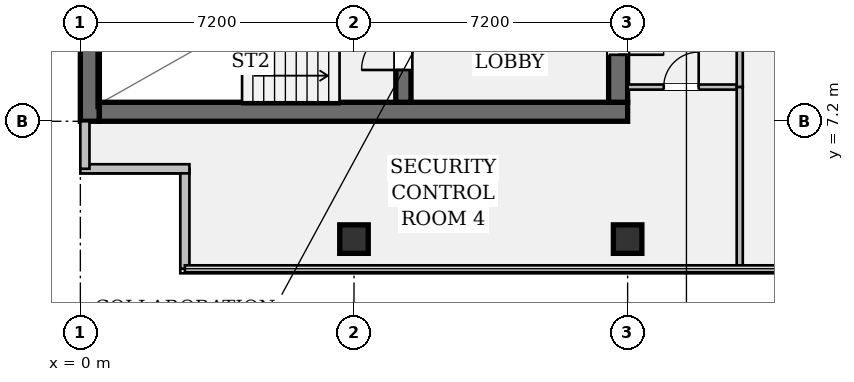
"""IFC4 building model, lengths in metres.
Left out: names, types, materials, properties, quantities, classifications, styles, units other than length and angle.
Written with IfcOpenShell. Run it as: python <this file> out.ifc"""

import sys

from ifc_helpers import new_model, si_unit, direction, frame, frame_2d, origin, origin_2d, place, context, subcontext, project, spatial, rectangle, hollow_rectangle, extrude, element, fill, save


model = new_model("IFC4")
c1 = context("Model", 3, precision=1e-05, world=origin(), true_north=direction((0.0, 1.0)))
c2 = subcontext(c1, "Body", "Model", "MODEL_VIEW")
j1 = project(units=[si_unit("LENGTHUNIT", "METRE"), si_unit("PLANEANGLEUNIT", "RADIAN")], contexts=[c1])
p1 = place(None, origin())
s1 = spatial("IfcSite", under=j1, at=p1, CompositionType="ELEMENT")
p2 = place(p1, origin())
s2 = spatial("IfcBuilding", under=s1, at=p2, CompositionType="ELEMENT")
p3 = place(p2, frame((0.0, 0.0, 215.25)))
s3 = spatial("IfcBuildingStorey", under=s2, at=p3, CompositionType="ELEMENT", Elevation=215.25)
p4 = place(p3, frame((0.25, 7.2, 0.0), z_axis=(0.0, 0.0, 1.0), x_axis=(0.0, 1.0, 0.0)))
e1 = element("IfcWall", 1, at=p4, inside=s3, PredefinedType="SHEAR", context=c2, shape_type="SweptSolid", body=[
    extrude(rectangle(XDim=28.8, YDim=0.5, at=frame_2d((14.4, 0.0))), origin(), (0.0, 0.0, 1.0), 3.24),
])
p5 = place(p3, frame((0.5, 7.45, 0.0), z_axis=(0.0, 0.0, 1.0), x_axis=(1.0, 0.0, 0.0)))
e2 = element("IfcWall", 2, at=p5, inside=s3, PredefinedType="SHEAR", context=c2, shape_type="SweptSolid", body=[
    extrude(rectangle(XDim=13.9, YDim=0.5, at=frame_2d((6.95, 0.0))), origin(), (0.0, 0.0, 1.0), 3.24),
])
p6 = place(p3, frame((14.15, 35.5, 0.0), z_axis=(0.0, 0.0, 1.0), x_axis=(0.0, -1.0, 0.0)))
e3 = element("IfcWall", 3, at=p6, inside=s3, PredefinedType="SHEAR", context=c2, shape_type="SweptSolid", body=[
    extrude(rectangle(XDim=27.8, YDim=0.5, at=frame_2d((13.9, 0.0))), origin(), (0.0, 0.0, 1.0), 3.24),
])
p7 = place(p6, frame((1.4, 0.0, 0.0)))
e4 = element("IfcOpeningElement", 4, at=p7, cuts=e3, PredefinedType="OPENING", context=c2, shape_type="SweptSolid", body=[
    extrude(rectangle(XDim=1.2, YDim=2.15, at=frame_2d((0.6, 1.075))), frame((0.0, 0.262, 0.0), z_axis=(0.0, -1.0, 0.0), x_axis=(1.0, 0.0, 0.0)), (0.0, 0.0, 1.0), 0.524),
])
p8 = place(p6, frame((25.35, 0.0, 0.0)))
e5 = element("IfcOpeningElement", 5, at=p8, cuts=e3, PredefinedType="OPENING", context=c2, shape_type="SweptSolid", body=[
    extrude(rectangle(XDim=1.2, YDim=2.15, at=frame_2d((0.6, 1.075))), frame((0.0, 0.262, 0.0), z_axis=(0.0, -1.0, 0.0), x_axis=(1.0, 0.0, 0.0)), (0.0, 0.0, 1.0), 0.524),
])
p9 = place(p6, frame((14.7, 0.0, 0.0)))
e6 = element("IfcOpeningElement", 6, at=p9, cuts=e3, PredefinedType="OPENING", context=c2, shape_type="SweptSolid", body=[
    extrude(rectangle(XDim=1.6, YDim=2.2, at=frame_2d((0.8, 1.1))), frame((0.0, 0.262, 0.0), z_axis=(0.0, -1.0, 0.0), x_axis=(1.0, 0.0, 0.0)), (0.0, 0.0, 1.0), 0.524),
])
p10 = place(p3, frame((8.5, 7.7, 0.0), z_axis=(0.0, 0.0, 1.0), x_axis=(0.0, 1.0, 0.0)))
e7 = element("IfcWall", 7, at=p10, inside=s3, PredefinedType="SHEAR", context=c2, shape_type="SweptSolid", body=[
    extrude(rectangle(XDim=3.78, YDim=0.4, at=frame_2d((1.89, 0.0))), origin(), (0.0, 0.0, 1.0), 3.24),
])
p11 = place(p10, frame((0.85, 0.0, 0.0)))
e8 = element("IfcOpeningElement", 8, at=p11, cuts=e7, PredefinedType="OPENING", context=c2, shape_type="SweptSolid", body=[
    extrude(rectangle(XDim=1.1, YDim=2.15, at=frame_2d((0.55, 1.075))), frame((0.0, 0.212, 0.0), z_axis=(0.0, -1.0, 0.0), x_axis=(1.0, 0.0, 0.0)), (0.0, 0.0, 1.0), 0.424),
])
for number, where, z_axis, x_axis in (
    (9, (7.2, 4.1, 0.0), (0.0, 0.0, 1.0), (1.0, 0.0, 0.0)),
    (10, (14.4, 4.1, 0.0), (0.0, 0.0, 1.0), (1.0, 0.0, 0.0)),
):
    element("IfcColumn", number, at=place(p3, frame(where, z_axis=z_axis, x_axis=x_axis)), inside=s3, PredefinedType="COLUMN", context=c2, shape_type="SweptSolid", body=[
        extrude(hollow_rectangle(XDim=0.75, YDim=0.75, WallThickness=0.045, at=origin_2d()), origin(), (0.0, 0.0, 1.0), 3.24),
    ])
p12 = place(p3, frame((2.75, 3.32, 0.0), z_axis=(0.0, 0.0, 1.0), x_axis=(0.0, 1.0, 0.0)))
e11 = element("IfcWall", 11, at=p12, inside=s3, PredefinedType="STANDARD", context=c2, shape_type="SweptSolid", body=[
    extrude(rectangle(XDim=2.63, YDim=0.24, at=frame_2d((1.315, 0.0))), origin(), (0.0, 0.0, 1.0), 3.24),
])
p13 = place(p3, frame((2.87, 5.95, 0.0), z_axis=(0.0, 0.0, 1.0), x_axis=(-1.0, 0.0, 0.0)))
e12 = element("IfcWall", 12, at=p13, inside=s3, PredefinedType="STANDARD", context=c2, shape_type="SweptSolid", body=[
    extrude(rectangle(XDim=2.87, YDim=0.24, at=frame_2d((1.435, 0.0))), origin(), (0.0, 0.0, 1.0), 3.24),
])
p14 = place(p3, frame((0.12, 5.95, 0.0), z_axis=(0.0, 0.0, 1.0), x_axis=(0.0, 1.0, 0.0)))
e13 = element("IfcWall", 13, at=p14, inside=s3, PredefinedType="STANDARD", context=c2, shape_type="SweptSolid", body=[
    extrude(rectangle(XDim=1.25, YDim=0.24, at=frame_2d((0.625, 0.0))), origin(), (0.0, 0.0, 1.0), 3.24),
])
p15 = place(p3, frame((14.4, 8.1, 0.0), z_axis=(0.0, 0.0, 1.0), x_axis=(1.0, 0.0, 0.0)))
e14 = element("IfcWall", 14, at=p15, inside=s3, PredefinedType="PARTITIONING", context=c2, shape_type="SweptSolid", body=[
    extrude(rectangle(XDim=2.95, YDim=0.135, at=frame_2d((1.475, 0.0))), origin(), (0.0, 0.0, 1.0), 2.808),
])
p16 = place(p15, frame((0.95, 0.0, 0.0)))
e15 = element("IfcOpeningElement", 15, at=p16, cuts=e14, PredefinedType="OPENING", context=c2, shape_type="SweptSolid", body=[
    extrude(rectangle(XDim=0.92, YDim=2.15, at=frame_2d((0.46, 1.075))), frame((0.0, 0.08, 0.0), z_axis=(0.0, -1.0, 0.0), x_axis=(1.0, 0.0, 0.0)), (0.0, 0.0, 1.0), 0.159),
])
p17 = place(p3, frame((17.35, 8.1, 0.0), z_axis=(0.0, 0.0, 1.0), x_axis=(0.0, 1.0, 0.0)))
e16 = element("IfcWall", 16, at=p17, inside=s3, PredefinedType="PARTITIONING", context=c2, shape_type="SweptSolid", body=[
    extrude(rectangle(XDim=7.6, YDim=0.16, at=frame_2d((3.8, 0.0))), origin(), (0.0, 0.0, 1.0), 2.613),
])
p18 = place(p3, frame((17.35, 3.32, 0.0), z_axis=(0.0, 0.0, 1.0), x_axis=(0.0, 1.0, 0.0)))
e17 = element("IfcWall", 17, at=p18, inside=s3, PredefinedType="PARTITIONING", context=c2, shape_type="SweptSolid", body=[
    extrude(rectangle(XDim=4.78, YDim=0.16, at=frame_2d((2.39, 0.0))), origin(), (0.0, 0.0, 1.0), 2.613),
])
p19 = place(p11, origin())
e18 = element("IfcDoor", 18, at=p19, inside=s3, OperationType="SINGLE_SWING_LEFT", PredefinedType="DOOR", context=c2, shape_type="SweptSolid", body=[
    extrude(rectangle(XDim=1.1, YDim=2.15, at=frame_2d((0.55, 1.075))), frame((0.0, 0.025, 0.0), z_axis=(0.0, -1.0, 0.0), x_axis=(1.0, 0.0, 0.0)), (0.0, 0.0, 1.0), 0.05),
])
fill(e8, e18)
p20 = place(p8, origin())
e19 = element("IfcDoor", 19, at=p20, inside=s3, OperationType="SINGLE_SWING_RIGHT", PredefinedType="DOOR", context=c2, shape_type="SweptSolid", body=[
    extrude(rectangle(XDim=1.2, YDim=2.15, at=frame_2d((0.6, 1.075))), frame((0.0, 0.025, 0.0), z_axis=(0.0, -1.0, 0.0), x_axis=(1.0, 0.0, 0.0)), (0.0, 0.0, 1.0), 0.05),
])
fill(e5, e19)
p21 = place(p16, origin())
e20 = element("IfcDoor", 20, at=p21, inside=s3, OperationType="SINGLE_SWING_RIGHT", PredefinedType="DOOR", context=c2, shape_type="SweptSolid", body=[
    extrude(rectangle(XDim=0.92, YDim=2.15, at=frame_2d((0.46, 1.075))), frame((0.0, 0.025, 0.0), z_axis=(0.0, -1.0, 0.0), x_axis=(1.0, 0.0, 0.0)), (0.0, 0.0, 1.0), 0.05),
])
fill(e15, e20)
save(model, sys.argv[1])
